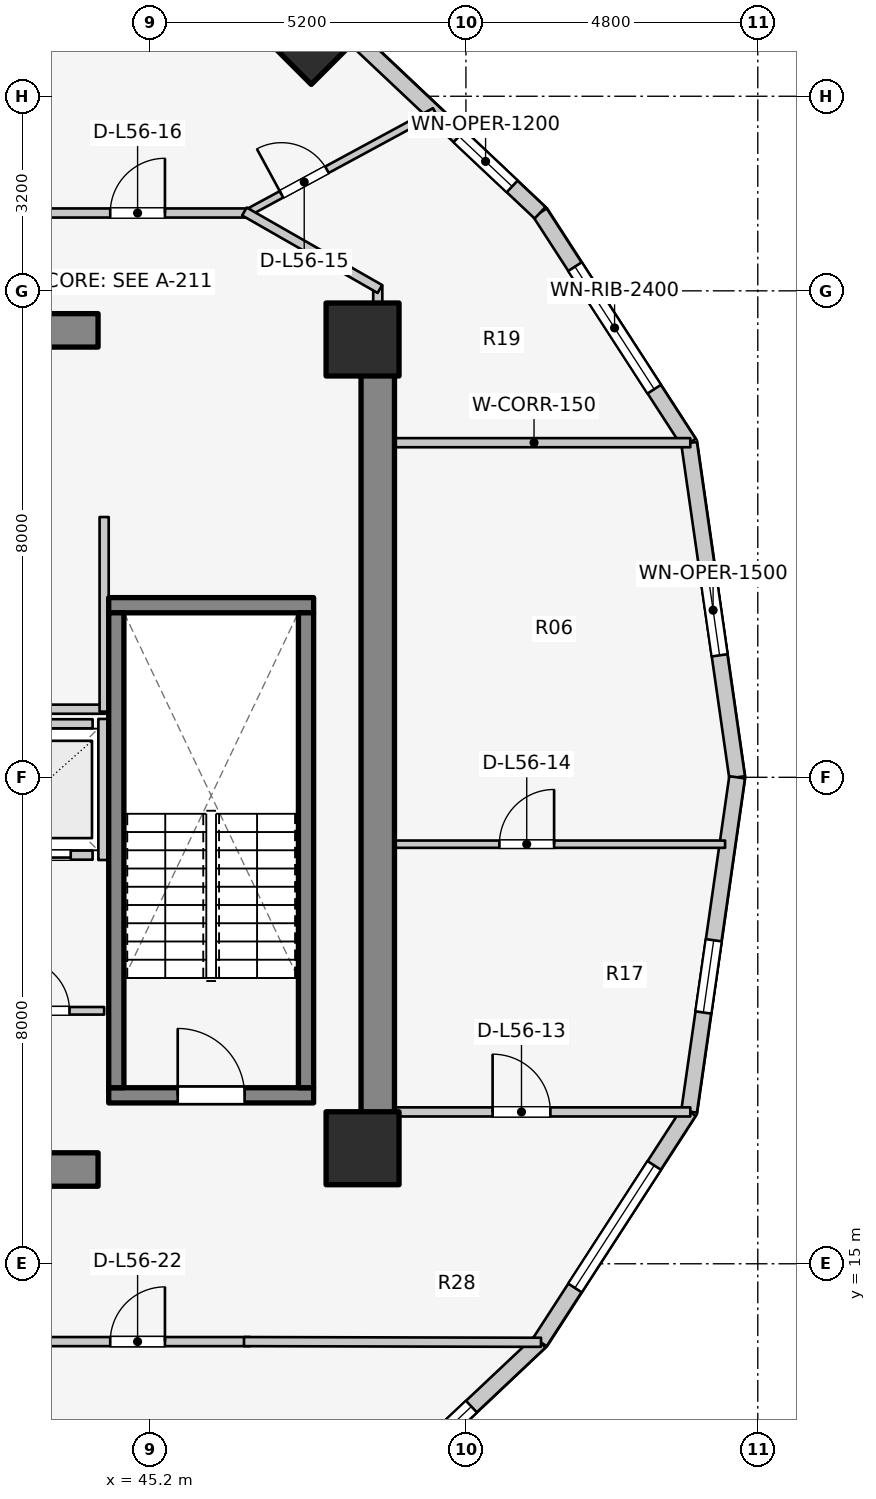
"""IFC4 building model, lengths in metres.
Left out: names, types, materials, properties, quantities, classifications, styles, units other than length and angle.
Written with IfcOpenShell. Run it as: python <this file> out.ifc"""

import sys

from ifc_helpers import new_model, si_unit, direction, frame, frame_2d, origin, origin_2d, place, context, subcontext, project, spatial, rectangle, extrude, element, fill, save


model = new_model("IFC4")
c1 = context("Model", 3, precision=1e-05, world=origin(), true_north=direction((0.0, 1.0)))
c2 = subcontext(c1, "Body", "Model", "MODEL_VIEW")
j1 = project(units=[si_unit("LENGTHUNIT", "METRE"), si_unit("PLANEANGLEUNIT", "RADIAN")], contexts=[c1])
p1 = place(None, origin())
s1 = spatial("IfcSite", under=j1, at=p1, CompositionType="ELEMENT")
p2 = place(p1, origin())
s2 = spatial("IfcBuilding", under=s1, at=p2, CompositionType="ELEMENT")
p3 = place(p2, frame((0.0, 0.0, 183.9)))
s3 = spatial("IfcBuildingStorey", under=s2, at=p3, CompositionType="ELEMENT", Elevation=183.9)
p4 = place(p3, frame((48.95, 17.05, 0.0), z_axis=(0.0, 0.0, 1.0), x_axis=(0.0, 1.0, 0.0)))
e1 = element("IfcWall", 1, at=p4, inside=s3, PredefinedType="SHEAR", context=c2, shape_type="SweptSolid", body=[
    extrude(rectangle(XDim=12.8, YDim=0.55, at=frame_2d((6.4, 0.0))), origin(), (0.0, 0.0, 1.0), 3.1),
])
for number, where, z_axis, x_axis in (
    (2, (39.85, 16.55, 0.0), (0.0, 0.0, 1.0), (1.0, 0.0, 0.0)),
    (3, (39.85, 30.35, 0.0), (0.0, 0.0, 1.0), (1.0, 0.0, 0.0)),
):
    element("IfcWall", number, at=place(p3, frame(where, z_axis=z_axis, x_axis=x_axis)), inside=s3, PredefinedType="SHEAR", context=c2, shape_type="SweptSolid", body=[
        extrude(rectangle(XDim=4.5, YDim=0.55, at=frame_2d((2.25, 0.0))), origin(), (0.0, 0.0, 1.0), 3.1),
    ])
p5 = place(p3, frame((44.525, 17.77, 0.0), z_axis=(0.0, 0.0, 1.0), x_axis=(1.0, 0.0, 0.0)))
e4 = element("IfcWall", 4, at=p5, inside=s3, PredefinedType="SOLIDWALL", context=c2, shape_type="SweptSolid", body=[
    extrude(rectangle(XDim=3.37, YDim=0.25, at=frame_2d((1.685, 0.0))), origin(), (0.0, 0.0, 1.0), 3.1),
])
p6 = place(p5, frame((1.135, 0.0, 0.0)))
e5 = element("IfcOpeningElement", 5, at=p6, cuts=e4, PredefinedType="OPENING", context=c2, shape_type="SweptSolid", body=[
    extrude(rectangle(XDim=1.1, YDim=2.1, at=frame_2d((0.55, 1.05))), frame((0.0, 0.135, 0.0), z_axis=(0.0, -1.0, 0.0), x_axis=(1.0, 0.0, 0.0)), (0.0, 0.0, 1.0), 0.27),
])
p7 = place(p3, frame((44.525, 25.83, 0.0), z_axis=(0.0, 0.0, 1.0), x_axis=(1.0, 0.0, 0.0)))
e6 = element("IfcWall", 6, at=p7, inside=s3, PredefinedType="SOLIDWALL", context=c2, shape_type="SweptSolid", body=[
    extrude(rectangle(XDim=3.37, YDim=0.25, at=frame_2d((1.685, 0.0))), origin(), (0.0, 0.0, 1.0), 3.1),
])
for number, where, z_axis, x_axis in (
    (7, (44.65, 17.895, 0.0), (0.0, 0.0, 1.0), (0.0, 1.0, 0.0)),
    (8, (47.77, 17.895, 0.0), (0.0, 0.0, 1.0), (0.0, 1.0, 0.0)),
):
    element("IfcWall", number, at=place(p3, frame(where, z_axis=z_axis, x_axis=x_axis)), inside=s3, PredefinedType="SOLIDWALL", context=c2, shape_type="SweptSolid", body=[
        extrude(rectangle(XDim=7.81, YDim=0.25, at=frame_2d((3.905, 0.0))), origin(), (0.0, 0.0, 1.0), 3.1),
    ])
for number, where, z_axis, x_axis in (
    (9, (48.7, 16.9, 0.0), (0.0, 0.0, 1.0), (1.0, 0.0, 0.0)),
    (10, (48.7, 30.2, 0.0), (0.0, 0.0, 1.0), (1.0, 0.0, 0.0)),
):
    element("IfcColumn", number, at=place(p3, frame(where, z_axis=z_axis, x_axis=x_axis)), inside=s3, PredefinedType="COLUMN", context=c2, shape_type="SweptSolid", body=[
        extrude(rectangle(XDim=1.2, YDim=1.2, at=origin_2d()), origin(), (0.0, 0.0, 1.0), 3.1),
    ])
p8 = place(p3, frame((47.857, 35.031, 0.0), z_axis=(0.0, 0.0, 1.0), x_axis=(0.707106781187, 0.707106781187, 0.0)))
e11 = element("IfcColumn", 11, at=p8, inside=s3, PredefinedType="COLUMN", context=c2, shape_type="SweptSolid", body=[
    extrude(rectangle(XDim=0.9, YDim=0.9, at=origin_2d()), origin(), (0.0, 0.0, 1.0), 3.1),
])
p9 = place(p3, frame((54.86, 23.0, 0.0), z_axis=(0.0, 0.0, 1.0), x_axis=(-0.142227632286, 0.989833976288, 0.0)))
e12 = element("IfcWall", 12, at=p9, inside=s3, PredefinedType="STANDARD", context=c2, shape_type="SweptSolid", body=[
    extrude(rectangle(XDim=5.553, YDim=0.26, at=frame_2d((2.776, 0.0))), origin(), (0.0, 0.0, 1.0), 2.85),
])
p10 = place(p9, frame((2.027, 0.0, 0.75)))
e13 = element("IfcOpeningElement", 13, at=p10, cuts=e12, PredefinedType="OPENING", context=c2, shape_type="SweptSolid", body=[
    extrude(rectangle(XDim=1.5, YDim=1.6, at=frame_2d((0.75, 0.8))), frame((0.0, 0.14, 0.0), z_axis=(0.0, -1.0, 0.0), x_axis=(1.0, 0.0, 0.0)), (0.0, 0.0, 1.0), 0.28),
])
p11 = place(p3, frame((54.07, 28.497, 0.0), z_axis=(0.0, 0.0, 1.0), x_axis=(-0.543358984534, 0.839500454989, 0.0)))
e14 = element("IfcWall", 14, at=p11, inside=s3, PredefinedType="STANDARD", context=c2, shape_type="SweptSolid", body=[
    extrude(rectangle(XDim=4.511, YDim=0.26, at=frame_2d((2.256, 0.0))), origin(), (0.0, 0.0, 1.0), 2.85),
])
p12 = place(p11, frame((1.056, 0.0, 0.75)))
e15 = element("IfcOpeningElement", 15, at=p12, cuts=e14, PredefinedType="OPENING", context=c2, shape_type="SweptSolid", body=[
    extrude(rectangle(XDim=2.4, YDim=1.7, at=frame_2d((1.2, 0.85))), frame((0.0, 0.14, 0.0), z_axis=(0.0, -1.0, 0.0), x_axis=(1.0, 0.0, 0.0)), (0.0, 0.0, 1.0), 0.28),
])
p13 = place(p3, frame((51.619, 32.284, 0.0), z_axis=(0.0, 0.0, 1.0), x_axis=(-0.727667301037, 0.68593024354, 0.0)))
e16 = element("IfcWall", 16, at=p13, inside=s3, PredefinedType="STANDARD", context=c2, shape_type="SweptSolid", body=[
    extrude(rectangle(XDim=4.604, YDim=0.26, at=frame_2d((2.302, 0.0))), origin(), (0.0, 0.0, 1.0), 2.85),
])
p14 = place(p13, frame((0.631, 0.0, 0.75)))
e17 = element("IfcOpeningElement", 17, at=p14, cuts=e16, PredefinedType="OPENING", context=c2, shape_type="SweptSolid", body=[
    extrude(rectangle(XDim=1.2, YDim=1.5, at=frame_2d((0.6, 0.75))), frame((0.0, 0.14, 0.0), z_axis=(0.0, -1.0, 0.0), x_axis=(1.0, 0.0, 0.0)), (0.0, 0.0, 1.0), 0.28),
])
p15 = place(p3, frame((48.269, 10.559, 0.0), z_axis=(0.0, 0.0, 1.0), x_axis=(0.727667301037, 0.68593024354, 0.0)))
e18 = element("IfcWall", 18, at=p15, inside=s3, PredefinedType="STANDARD", context=c2, shape_type="SweptSolid", body=[
    extrude(rectangle(XDim=4.604, YDim=0.26, at=frame_2d((2.302, 0.0))), origin(), (0.0, 0.0, 1.0), 2.85),
])
p16 = place(p15, frame((1.552, 0.0, 0.75)))
e19 = element("IfcOpeningElement", 19, at=p16, cuts=e18, PredefinedType="OPENING", context=c2, shape_type="SweptSolid", body=[
    extrude(rectangle(XDim=1.5, YDim=1.6, at=frame_2d((0.75, 0.8))), frame((0.0, 0.14, 0.0), z_axis=(0.0, -1.0, 0.0), x_axis=(1.0, 0.0, 0.0)), (0.0, 0.0, 1.0), 0.28),
])
p17 = place(p3, frame((51.619, 13.716, 0.0), z_axis=(0.0, 0.0, 1.0), x_axis=(0.543358984534, 0.839500454989, 0.0)))
e20 = element("IfcWall", 20, at=p17, inside=s3, PredefinedType="STANDARD", context=c2, shape_type="SweptSolid", body=[
    extrude(rectangle(XDim=4.511, YDim=0.26, at=frame_2d((2.256, 0.0))), origin(), (0.0, 0.0, 1.0), 2.85),
])
p18 = place(p17, frame((1.056, 0.0, 0.75)))
e21 = element("IfcOpeningElement", 21, at=p18, cuts=e20, PredefinedType="OPENING", context=c2, shape_type="SweptSolid", body=[
    extrude(rectangle(XDim=2.4, YDim=1.7, at=frame_2d((1.2, 0.85))), frame((0.0, 0.14, 0.0), z_axis=(0.0, -1.0, 0.0), x_axis=(1.0, 0.0, 0.0)), (0.0, 0.0, 1.0), 0.28),
])
p19 = place(p3, frame((54.07, 17.503, 0.0), z_axis=(0.0, 0.0, 1.0), x_axis=(0.142227632286, 0.989833976288, 0.0)))
e22 = element("IfcWall", 22, at=p19, inside=s3, PredefinedType="STANDARD", context=c2, shape_type="SweptSolid", body=[
    extrude(rectangle(XDim=5.553, YDim=0.26, at=frame_2d((2.776, 0.0))), origin(), (0.0, 0.0, 1.0), 2.85),
])
p20 = place(p19, frame((1.646, 0.0, 0.75)))
e23 = element("IfcOpeningElement", 23, at=p20, cuts=e22, PredefinedType="OPENING", context=c2, shape_type="SweptSolid", body=[
    extrude(rectangle(XDim=1.2, YDim=1.5, at=frame_2d((0.6, 0.75))), frame((0.0, 0.14, 0.0), z_axis=(0.0, -1.0, 0.0), x_axis=(1.0, 0.0, 0.0)), (0.0, 0.0, 1.0), 0.28),
])
p21 = place(p3, frame((42.44, 21.72, 0.0), z_axis=(0.0, 0.0, 1.0), x_axis=(1.0, 0.0, 0.0)))
e24 = element("IfcWall", 24, at=p21, inside=s3, PredefinedType="SOLIDWALL", context=c2, shape_type="SweptSolid", body=[
    extrude(rectangle(XDim=1.82, YDim=0.15, at=frame_2d((0.91, 0.0))), origin(), (0.0, 0.0, 1.0), 2.855),
])
p22 = place(p21, frame((0.36, 0.0, 0.0)))
e25 = element("IfcOpeningElement", 25, at=p22, cuts=e24, PredefinedType="OPENING", context=c2, shape_type="SweptSolid", body=[
    extrude(rectangle(XDim=1.1, YDim=2.1, at=frame_2d((0.55, 1.05))), frame((0.0, 0.085, 0.0), z_axis=(0.0, -1.0, 0.0), x_axis=(1.0, 0.0, 0.0)), (0.0, 0.0, 1.0), 0.17),
])
p23 = place(p3, frame((42.44, 23.88, 0.0), z_axis=(0.0, 0.0, 1.0), x_axis=(1.0, 0.0, 0.0)))
e26 = element("IfcWall", 26, at=p23, inside=s3, PredefinedType="SOLIDWALL", context=c2, shape_type="SweptSolid", body=[
    extrude(rectangle(XDim=1.82, YDim=0.15, at=frame_2d((0.91, 0.0))), origin(), (0.0, 0.0, 1.0), 2.855),
])
p24 = place(p3, frame((44.43, 21.64, 0.0), z_axis=(0.0, 0.0, 1.0), x_axis=(0.0, 1.0, 0.0)))
e27 = element("IfcWall", 27, at=p24, inside=s3, PredefinedType="SOLIDWALL", context=c2, shape_type="SweptSolid", body=[
    extrude(rectangle(XDim=2.32, YDim=0.15, at=frame_2d((1.16, 0.0))), origin(), (0.0, 0.0, 1.0), 2.855),
])
p25 = place(p3, frame((39.4, 24.12, 0.0), z_axis=(0.0, 0.0, 1.0), x_axis=(1.0, 0.0, 0.0)))
e28 = element("IfcWall", 28, at=p25, inside=s3, PredefinedType="PARTITIONING", context=c2, shape_type="SweptSolid", body=[
    extrude(rectangle(XDim=5.08, YDim=0.15, at=frame_2d((2.54, 0.0))), origin(), (0.0, 0.0, 1.0), 2.12),
])
p26 = place(p3, frame((44.45, 24.08, 0.0), z_axis=(0.0, 0.0, 1.0), x_axis=(0.0, 1.0, 0.0)))
e29 = element("IfcWall", 29, at=p26, inside=s3, PredefinedType="PARTITIONING", context=c2, shape_type="SweptSolid", body=[
    extrude(rectangle(XDim=3.2, YDim=0.15, at=frame_2d((1.6, 0.0))), origin(), (0.0, 0.0, 1.0), 2.855),
])
p27 = place(p3, frame((39.58, 19.16, 0.0), z_axis=(0.0, 0.0, 1.0), x_axis=(1.0, 0.0, 0.0)))
e30 = element("IfcWall", 30, at=p27, inside=s3, PredefinedType="PARTITIONING", context=c2, shape_type="SweptSolid", body=[
    extrude(rectangle(XDim=4.87, YDim=0.125, at=frame_2d((2.435, 0.0))), origin(), (0.0, 0.0, 1.0), 2.12),
])
p28 = place(p27, frame((3.45, 0.0, 0.0)))
e31 = element("IfcOpeningElement", 31, at=p28, cuts=e30, PredefinedType="OPENING", context=c2, shape_type="SweptSolid", body=[
    extrude(rectangle(XDim=0.85, YDim=2.05, at=frame_2d((0.425, 1.025))), frame((0.0, 0.073, 0.0), z_axis=(0.0, -1.0, 0.0), x_axis=(1.0, 0.0, 0.0)), (0.0, 0.0, 1.0), 0.145),
])
p29 = place(p3, frame((48.95, 17.497, 0.0), z_axis=(0.0, 0.0, 1.0), x_axis=(1.0, 0.0, 0.0)))
e32 = element("IfcWall", 32, at=p29, inside=s3, PredefinedType="PARTITIONING", context=c2, shape_type="SweptSolid", body=[
    extrude(rectangle(XDim=5.14, YDim=0.15, at=frame_2d((2.57, 0.0))), origin(), (0.0, 0.0, 1.0), 2.855),
])
p30 = place(p29, frame((1.889, 0.0, 0.0)))
e33 = element("IfcOpeningElement", 33, at=p30, cuts=e32, PredefinedType="OPENING", context=c2, shape_type="SweptSolid", body=[
    extrude(rectangle(XDim=0.95, YDim=2.1, at=frame_2d((0.475, 1.05))), frame((0.0, 0.085, 0.0), z_axis=(0.0, -1.0, 0.0), x_axis=(1.0, 0.0, 0.0)), (0.0, 0.0, 1.0), 0.17),
])
p31 = place(p3, frame((48.95, 28.503, 0.0), z_axis=(0.0, 0.0, 1.0), x_axis=(1.0, 0.0, 0.0)))
e34 = element("IfcWall", 34, at=p31, inside=s3, PredefinedType="PARTITIONING", context=c2, shape_type="SweptSolid", body=[
    extrude(rectangle(XDim=5.14, YDim=0.15, at=frame_2d((2.57, 0.0))), origin(), (0.0, 0.0, 1.0), 2.855),
])
p32 = place(p3, frame((48.95, 21.9, 0.0), z_axis=(0.0, 0.0, 1.0), x_axis=(1.0, 0.0, 0.0)))
e35 = element("IfcWall", 35, at=p32, inside=s3, PredefinedType="MOVABLE", context=c2, shape_type="SweptSolid", body=[
    extrude(rectangle(XDim=5.712, YDim=0.12, at=frame_2d((2.856, 0.0))), origin(), (0.0, 0.0, 1.0), 2.855),
])
p33 = place(p32, frame((2.0, 0.0, 0.0)))
e36 = element("IfcOpeningElement", 36, at=p33, cuts=e35, PredefinedType="OPENING", context=c2, shape_type="SweptSolid", body=[
    extrude(rectangle(XDim=0.9, YDim=2.1, at=frame_2d((0.45, 1.05))), frame((0.0, 0.07, 0.0), z_axis=(0.0, -1.0, 0.0), x_axis=(1.0, 0.0, 0.0)), (0.0, 0.0, 1.0), 0.14),
])
p34 = place(p3, frame((48.95, 29.8, 0.0), z_axis=(0.0, 0.0, 1.0), x_axis=(0.0, 1.0, 0.0)))
e37 = element("IfcWall", 37, at=p34, inside=s3, PredefinedType="PARTITIONING", context=c2, shape_type="SweptSolid", body=[
    extrude(rectangle(XDim=1.29, YDim=0.15, at=frame_2d((0.645, 0.0))), origin(), (0.0, 0.0, 1.0), 2.855),
])
p35 = place(p3, frame((46.756, 32.256, 0.0), z_axis=(0.0, 0.0, 1.0), x_axis=(0.879385297668, 0.476110804587, 0.0)))
e38 = element("IfcWall", 38, at=p35, inside=s3, PredefinedType="MOVABLE", context=c2, shape_type="SweptSolid", body=[
    extrude(rectangle(XDim=3.56, YDim=0.12, at=frame_2d((1.78, 0.0))), origin(), (0.0, 0.0, 1.0), 2.22),
])
p36 = place(p35, frame((0.694, 0.0, 0.0)))
e39 = element("IfcOpeningElement", 39, at=p36, cuts=e38, PredefinedType="OPENING", context=c2, shape_type="SweptSolid", body=[
    extrude(rectangle(XDim=0.85, YDim=2.05, at=frame_2d((0.425, 1.025))), frame((0.0, 0.07, 0.0), z_axis=(0.0, -1.0, 0.0), x_axis=(1.0, 0.0, 0.0)), (0.0, 0.0, 1.0), 0.14),
])
p37 = place(p3, frame((39.33, 32.28, 0.0), z_axis=(0.0, 0.0, 1.0), x_axis=(1.0, 0.0, 0.0)))
e40 = element("IfcWall", 40, at=p37, inside=s3, PredefinedType="PARTITIONING", context=c2, shape_type="SweptSolid", body=[
    extrude(rectangle(XDim=7.52, YDim=0.15, at=frame_2d((3.76, 0.0))), origin(), (0.0, 0.0, 1.0), 2.299),
])
p38 = place(p37, frame((5.22, 0.0, 0.0)))
e41 = element("IfcOpeningElement", 41, at=p38, cuts=e40, PredefinedType="OPENING", context=c2, shape_type="SweptSolid", body=[
    extrude(rectangle(XDim=0.9, YDim=2.1, at=frame_2d((0.45, 1.05))), frame((0.0, 0.085, 0.0), z_axis=(0.0, -1.0, 0.0), x_axis=(1.0, 0.0, 0.0)), (0.0, 0.0, 1.0), 0.17),
])
p39 = place(p3, frame((46.757, 32.305, 0.0), z_axis=(0.0, 0.0, 1.0), x_axis=(0.867991349648, -0.496579315857, 0.0)))
e42 = element("IfcWall", 42, at=p39, inside=s3, PredefinedType="PARTITIONING", context=c2, shape_type="SweptSolid", body=[
    extrude(rectangle(XDim=2.567, YDim=0.15, at=frame_2d((1.283, 0.0))), origin(), (0.0, 0.0, 1.0), 2.22),
])
p40 = place(p3, frame((39.33, 13.72, 0.0), z_axis=(0.0, 0.0, 1.0), x_axis=(1.0, 0.0, 0.0)))
e43 = element("IfcWall", 43, at=p40, inside=s3, PredefinedType="PARTITIONING", context=c2, shape_type="SweptSolid", body=[
    extrude(rectangle(XDim=7.52, YDim=0.15, at=frame_2d((3.76, 0.0))), origin(), (0.0, 0.0, 1.0), 2.299),
])
p41 = place(p40, frame((5.22, 0.0, 0.0)))
e44 = element("IfcOpeningElement", 44, at=p41, cuts=e43, PredefinedType="OPENING", context=c2, shape_type="SweptSolid", body=[
    extrude(rectangle(XDim=0.9, YDim=2.1, at=frame_2d((0.45, 1.05))), frame((0.0, 0.085, 0.0), z_axis=(0.0, -1.0, 0.0), x_axis=(1.0, 0.0, 0.0)), (0.0, 0.0, 1.0), 0.17),
])
p42 = place(p3, frame((46.75, 13.72, 0.0), z_axis=(0.0, 0.0, 1.0), x_axis=(0.999997122315, -0.00239903348, 0.0)))
e45 = element("IfcWall", 45, at=p42, inside=s3, PredefinedType="PARTITIONING", context=c2, shape_type="SweptSolid", body=[
    extrude(rectangle(XDim=4.885, YDim=0.15, at=frame_2d((2.442, 0.0))), origin(), (0.0, 0.0, 1.0), 2.22),
])
p43 = place(p3, frame((37.812, 33.708, 0.0), z_axis=(0.0, 0.0, 1.0), x_axis=(0.844640430122, 0.535334048799, 0.0)))
e46 = element("IfcWall", 46, at=p43, inside=s3, PredefinedType="PARTITIONING", context=c2, shape_type="SweptSolid", body=[
    extrude(rectangle(XDim=7.188, YDim=0.125, at=frame_2d((3.594, 0.0))), origin(), (0.0, 0.0, 1.0), 2.299),
])
p44 = place(p10, origin())
e47 = element("IfcWindow", 47, at=p44, inside=s3, PartitioningType="SINGLE_PANEL", PredefinedType="WINDOW", context=c2, shape_type="SweptSolid", body=[
    extrude(rectangle(XDim=1.5, YDim=1.6, at=frame_2d((0.75, 0.8))), frame((0.0, 0.03, 0.0), z_axis=(0.0, -1.0, 0.0), x_axis=(1.0, 0.0, 0.0)), (0.0, 0.0, 1.0), 0.06),
])
fill(e13, e47)
p45 = place(p12, origin())
e48 = element("IfcWindow", 48, at=p45, inside=s3, PartitioningType="SINGLE_PANEL", PredefinedType="WINDOW", context=c2, shape_type="SweptSolid", body=[
    extrude(rectangle(XDim=2.4, YDim=1.7, at=frame_2d((1.2, 0.85))), frame((0.0, 0.03, 0.0), z_axis=(0.0, -1.0, 0.0), x_axis=(1.0, 0.0, 0.0)), (0.0, 0.0, 1.0), 0.06),
])
fill(e15, e48)
p46 = place(p14, origin())
e49 = element("IfcWindow", 49, at=p46, inside=s3, PartitioningType="SINGLE_PANEL", PredefinedType="WINDOW", context=c2, shape_type="SweptSolid", body=[
    extrude(rectangle(XDim=1.2, YDim=1.5, at=frame_2d((0.6, 0.75))), frame((0.0, 0.03, 0.0), z_axis=(0.0, -1.0, 0.0), x_axis=(1.0, 0.0, 0.0)), (0.0, 0.0, 1.0), 0.06),
])
fill(e17, e49)
p47 = place(p16, origin())
e50 = element("IfcWindow", 50, at=p47, inside=s3, PartitioningType="SINGLE_PANEL", PredefinedType="WINDOW", context=c2, shape_type="SweptSolid", body=[
    extrude(rectangle(XDim=1.5, YDim=1.6, at=frame_2d((0.75, 0.8))), frame((0.0, 0.03, 0.0), z_axis=(0.0, -1.0, 0.0), x_axis=(1.0, 0.0, 0.0)), (0.0, 0.0, 1.0), 0.06),
])
fill(e19, e50)
p48 = place(p18, origin())
e51 = element("IfcWindow", 51, at=p48, inside=s3, PartitioningType="SINGLE_PANEL", PredefinedType="WINDOW", context=c2, shape_type="SweptSolid", body=[
    extrude(rectangle(XDim=2.4, YDim=1.7, at=frame_2d((1.2, 0.85))), frame((0.0, 0.03, 0.0), z_axis=(0.0, -1.0, 0.0), x_axis=(1.0, 0.0, 0.0)), (0.0, 0.0, 1.0), 0.06),
])
fill(e21, e51)
p49 = place(p20, origin())
e52 = element("IfcWindow", 52, at=p49, inside=s3, PartitioningType="SINGLE_PANEL", PredefinedType="WINDOW", context=c2, shape_type="SweptSolid", body=[
    extrude(rectangle(XDim=1.2, YDim=1.5, at=frame_2d((0.6, 0.75))), frame((0.0, 0.03, 0.0), z_axis=(0.0, -1.0, 0.0), x_axis=(1.0, 0.0, 0.0)), (0.0, 0.0, 1.0), 0.06),
])
fill(e23, e52)
p50 = place(p6, origin())
e53 = element("IfcDoor", 53, at=p50, inside=s3, OperationType="SINGLE_SWING_LEFT", PredefinedType="DOOR", context=c2, shape_type="SweptSolid", body=[
    extrude(rectangle(XDim=1.1, YDim=2.1, at=frame_2d((0.55, 1.05))), frame((0.0, 0.025, 0.0), z_axis=(0.0, -1.0, 0.0), x_axis=(1.0, 0.0, 0.0)), (0.0, 0.0, 1.0), 0.05),
])
fill(e5, e53)
p51 = place(p22, origin())
e54 = element("IfcDoor", 54, at=p51, inside=s3, OperationType="DOUBLE_DOOR_SLIDING", PredefinedType="DOOR", context=c2, shape_type="SweptSolid", body=[
    extrude(rectangle(XDim=1.1, YDim=2.1, at=frame_2d((0.55, 1.05))), frame((0.0, 0.025, 0.0), z_axis=(0.0, -1.0, 0.0), x_axis=(1.0, 0.0, 0.0)), (0.0, 0.0, 1.0), 0.05),
])
fill(e25, e54)
p52 = place(p28, origin())
e55 = element("IfcDoor", 55, at=p52, inside=s3, OperationType="SINGLE_SWING_LEFT", PredefinedType="DOOR", context=c2, shape_type="SweptSolid", body=[
    extrude(rectangle(XDim=0.85, YDim=2.05, at=frame_2d((0.425, 1.025))), frame((0.0, 0.025, 0.0), z_axis=(0.0, -1.0, 0.0), x_axis=(1.0, 0.0, 0.0)), (0.0, 0.0, 1.0), 0.05),
])
fill(e31, e55)
p53 = place(p30, origin())
e56 = element("IfcDoor", 56, at=p53, inside=s3, OperationType="SINGLE_SWING_LEFT", PredefinedType="DOOR", context=c2, shape_type="SweptSolid", body=[
    extrude(rectangle(XDim=0.95, YDim=2.1, at=frame_2d((0.475, 1.05))), frame((0.0, 0.025, 0.0), z_axis=(0.0, -1.0, 0.0), x_axis=(1.0, 0.0, 0.0)), (0.0, 0.0, 1.0), 0.05),
])
fill(e33, e56)
p54 = place(p33, origin())
e57 = element("IfcDoor", 57, at=p54, inside=s3, OperationType="SINGLE_SWING_RIGHT", PredefinedType="DOOR", context=c2, shape_type="SweptSolid", body=[
    extrude(rectangle(XDim=0.9, YDim=2.1, at=frame_2d((0.45, 1.05))), frame((0.0, 0.025, 0.0), z_axis=(0.0, -1.0, 0.0), x_axis=(1.0, 0.0, 0.0)), (0.0, 0.0, 1.0), 0.05),
])
fill(e36, e57)
p55 = place(p36, origin())
e58 = element("IfcDoor", 58, at=p55, inside=s3, OperationType="SINGLE_SWING_LEFT", PredefinedType="DOOR", context=c2, shape_type="SweptSolid", body=[
    extrude(rectangle(XDim=0.85, YDim=2.05, at=frame_2d((0.425, 1.025))), frame((0.0, 0.025, 0.0), z_axis=(0.0, -1.0, 0.0), x_axis=(1.0, 0.0, 0.0)), (0.0, 0.0, 1.0), 0.05),
])
fill(e39, e58)
p56 = place(p38, origin())
e59 = element("IfcDoor", 59, at=p56, inside=s3, OperationType="SINGLE_SWING_RIGHT", PredefinedType="DOOR", context=c2, shape_type="SweptSolid", body=[
    extrude(rectangle(XDim=0.9, YDim=2.1, at=frame_2d((0.45, 1.05))), frame((0.0, 0.025, 0.0), z_axis=(0.0, -1.0, 0.0), x_axis=(1.0, 0.0, 0.0)), (0.0, 0.0, 1.0), 0.05),
])
fill(e41, e59)
p57 = place(p41, origin())
e60 = element("IfcDoor", 60, at=p57, inside=s3, OperationType="SINGLE_SWING_RIGHT", PredefinedType="DOOR", context=c2, shape_type="SweptSolid", body=[
    extrude(rectangle(XDim=0.9, YDim=2.1, at=frame_2d((0.45, 1.05))), frame((0.0, 0.025, 0.0), z_axis=(0.0, -1.0, 0.0), x_axis=(1.0, 0.0, 0.0)), (0.0, 0.0, 1.0), 0.05),
])
fill(e44, e60)
save(model, sys.argv[1])
